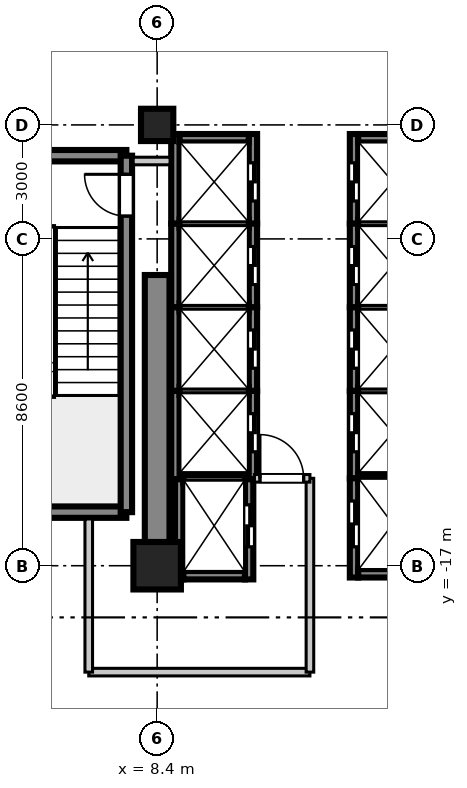
"""IFC4 building model, lengths in metres.
Left out: names, types, materials, properties, quantities, classifications, styles, units other than length and angle.
Written with IfcOpenShell. Run it as: python <this file> out.ifc"""

import sys

from ifc_helpers import new_model, si_unit, direction, frame, frame_2d, origin, origin_2d, place, context, subcontext, project, spatial, rectangle, extrude, source, transform, mapped, element, fill, save


model = new_model("IFC4")
c1 = context("Model", 3, precision=1e-05, world=origin(), true_north=direction((0.0, 1.0)))
c2 = subcontext(c1, "Body", "Model", "MODEL_VIEW")
j1 = project(units=[si_unit("LENGTHUNIT", "METRE"), si_unit("PLANEANGLEUNIT", "RADIAN")], contexts=[c1])
p1 = place(None, origin())
s1 = spatial("IfcSite", under=j1, at=p1, CompositionType="ELEMENT")
p2 = place(p1, origin())
s2 = spatial("IfcBuilding", under=s1, at=p2, CompositionType="ELEMENT")
p3 = place(p2, frame((0.0, 0.0, 139.4)))
s3 = spatial("IfcBuildingStorey", under=s2, at=p3, CompositionType="ELEMENT", Elevation=139.4)
m1 = source(origin(), c2, "Body", "SweptSolid", [
    extrude(rectangle(XDim=1.25, YDim=1.25, at=origin_2d()), origin(), (0.0, 0.0, 1.0), 4.755),
])
p4 = place(p3, frame((8.4, -17.0, 0.0), z_axis=(0.0, 0.0, 1.0), x_axis=(1.0, 0.0, 0.0)))
e1 = element("IfcColumn", 1, at=p4, inside=s3, PredefinedType="COLUMN", context=c2, shape_type="MappedRepresentation", body=[
    mapped(m1, transform((0.0, 0.0, 0.0), scale=1.0)),
])
m2 = source(origin(), c2, "Body", "SweptSolid", [
    extrude(rectangle(XDim=0.85, YDim=0.85, at=origin_2d()), origin(), (0.0, 0.0, 1.0), 4.755),
])
p5 = place(p3, frame((8.4, -5.4, 0.0), z_axis=(0.0, 0.0, 1.0), x_axis=(1.0, 0.0, 0.0)))
e2 = element("IfcColumn", 2, at=p5, inside=s3, PredefinedType="PILASTER", context=c2, shape_type="MappedRepresentation", body=[
    mapped(m2, transform((0.0, 0.0, 0.0), scale=1.0)),
])
m3 = source(origin(), c2, "Body", "SweptSolid", [
    extrude(rectangle(XDim=7.65, YDim=0.65, at=frame_2d((3.825, 0.0))), origin(), (0.0, 0.0, 1.0), 4.44),
])
p6 = place(p3, frame((8.4, -17.0, 0.0), z_axis=(0.0, 0.0, 1.0), x_axis=(0.0, 1.0, 0.0)))
e3 = element("IfcWall", 3, at=p6, inside=s3, PredefinedType="SHEAR", context=c2, shape_type="MappedRepresentation", body=[
    mapped(m3, transform((0.0, 0.0, 0.0), scale=1.0)),
])
m4 = source(origin(), c2, "Body", "SweptSolid", [
    extrude(rectangle(XDim=3.98, YDim=0.3, at=frame_2d((1.99, 0.0))), origin(), (0.0, 0.0, 1.0), 4.44),
])
for number, where, z_axis, x_axis in (
    (4, (3.61, -15.59, 0.0), (0.0, 0.0, 1.0), (1.0, 0.0, 0.0)),
    (5, (3.61, -6.21, 0.0), (0.0, 0.0, 1.0), (1.0, 0.0, 0.0)),
):
    element("IfcWall", number, at=place(p3, frame(where, z_axis=z_axis, x_axis=x_axis)), inside=s3, PredefinedType="SHEAR", context=c2, shape_type="MappedRepresentation", body=[
        mapped(m4, transform((0.0, 0.0, 0.0), scale=1.0)),
    ])
m5 = source(origin(), c2, "Body", "SweptSolid", [
    extrude(rectangle(XDim=9.38, YDim=0.3, at=frame_2d((4.69, 0.0))), origin(), (0.0, 0.0, 1.0), 4.44),
])
p7 = place(p3, frame((7.59, -15.59, 0.0), z_axis=(0.0, 0.0, 1.0), x_axis=(0.0, 1.0, 0.0)))
e6 = element("IfcWall", 6, at=p7, inside=s3, PredefinedType="SHEAR", context=c2, shape_type="MappedRepresentation", body=[
    mapped(m5, transform((0.0, 0.0, 0.0), scale=1.0)),
])
p8 = place(p7, frame((7.79, 0.0, 0.0)))
e7 = element("IfcOpeningElement", 7, at=p8, cuts=e6, PredefinedType="OPENING", context=c2, shape_type="SweptSolid", body=[
    extrude(rectangle(XDim=1.1, YDim=2.15, at=frame_2d((0.55, 1.075))), frame((0.0, 0.16, 0.0), z_axis=(0.0, -1.0, 0.0), x_axis=(1.0, 0.0, 0.0)), (0.0, 0.0, 1.0), 0.32),
])
m6 = source(origin(), c2, "Body", "SweptSolid", [
    extrude(rectangle(XDim=2.36, YDim=0.22, at=frame_2d((1.18, 0.0))), origin(), (0.0, 0.0, 1.0), 4.44),
])
p9 = place(p3, frame((13.58, -8.0, 0.0), z_axis=(0.0, 0.0, 1.0), x_axis=(0.0, 1.0, 0.0)))
e8 = element("IfcWall", 8, at=p9, inside=s3, PredefinedType="SHEAR", context=c2, shape_type="MappedRepresentation", body=[
    mapped(m6, transform((0.0, 0.0, 0.0), scale=1.0)),
])
p10 = place(p9, frame((0.6, 0.0, 0.0)))
e9 = element("IfcOpeningElement", 9, at=p10, cuts=e8, PredefinedType="OPENING", context=c2, shape_type="SweptSolid", body=[
    extrude(rectangle(XDim=1.0, YDim=2.2, at=frame_2d((0.5, 1.1))), frame((0.0, 0.12, 0.0), z_axis=(0.0, -1.0, 0.0), x_axis=(1.0, 0.0, 0.0)), (0.0, 0.0, 1.0), 0.24),
])
m7 = source(origin(), c2, "Body", "SweptSolid", [
    extrude(rectangle(XDim=1.82, YDim=0.22, at=frame_2d((0.91, 0.0))), origin(), (0.0, 0.0, 1.0), 4.44),
])
p11 = place(p3, frame((13.69, -5.75, 0.0), z_axis=(0.0, 0.0, 1.0), x_axis=(1.0, 0.0, 0.0)))
e10 = element("IfcWall", 10, at=p11, inside=s3, PredefinedType="SHEAR", context=c2, shape_type="MappedRepresentation", body=[
    mapped(m7, transform((0.0, 0.0, 0.0), scale=1.0)),
])
m8 = source(origin(), c2, "Body", "SweptSolid", [
    extrude(rectangle(XDim=2.2, YDim=0.22, at=frame_2d((1.1, 0.0))), origin(), (0.0, 0.0, 1.0), 4.44),
])
p12 = place(p3, frame((13.58, -10.2, 0.0), z_axis=(0.0, 0.0, 1.0), x_axis=(0.0, 1.0, 0.0)))
e11 = element("IfcWall", 11, at=p12, inside=s3, PredefinedType="SHEAR", context=c2, shape_type="MappedRepresentation", body=[
    mapped(m8, transform((0.0, 0.0, 0.0), scale=1.0)),
])
p13 = place(p12, frame((0.6, 0.0, 0.0)))
e12 = element("IfcOpeningElement", 12, at=p13, cuts=e11, PredefinedType="OPENING", context=c2, shape_type="SweptSolid", body=[
    extrude(rectangle(XDim=1.0, YDim=2.2, at=frame_2d((0.5, 1.1))), frame((0.0, 0.12, 0.0), z_axis=(0.0, -1.0, 0.0), x_axis=(1.0, 0.0, 0.0)), (0.0, 0.0, 1.0), 0.24),
])
m9 = source(origin(), c2, "Body", "SweptSolid", [
    extrude(rectangle(XDim=1.82, YDim=0.22, at=frame_2d((0.91, 0.0))), origin(), (0.0, 0.0, 1.0), 4.8),
])
p14 = place(p3, frame((13.69, -8.0, 0.0), z_axis=(0.0, 0.0, 1.0), x_axis=(1.0, 0.0, 0.0)))
e13 = element("IfcWall", 13, at=p14, inside=s3, PredefinedType="SHEAR", context=c2, shape_type="MappedRepresentation", body=[
    mapped(m9, transform((0.0, 0.0, 0.0), scale=1.0)),
])
p15 = place(p3, frame((13.58, -12.4, 0.0), z_axis=(0.0, 0.0, 1.0), x_axis=(0.0, 1.0, 0.0)))
e14 = element("IfcWall", 14, at=p15, inside=s3, PredefinedType="SHEAR", context=c2, shape_type="MappedRepresentation", body=[
    mapped(m8, transform((0.0, 0.0, 0.0), scale=1.0)),
])
p16 = place(p15, frame((0.6, 0.0, 0.0)))
e15 = element("IfcOpeningElement", 15, at=p16, cuts=e14, PredefinedType="OPENING", context=c2, shape_type="SweptSolid", body=[
    extrude(rectangle(XDim=1.0, YDim=2.2, at=frame_2d((0.5, 1.1))), frame((0.0, 0.12, 0.0), z_axis=(0.0, -1.0, 0.0), x_axis=(1.0, 0.0, 0.0)), (0.0, 0.0, 1.0), 0.24),
])
p17 = place(p3, frame((13.69, -10.2, 0.0), z_axis=(0.0, 0.0, 1.0), x_axis=(1.0, 0.0, 0.0)))
e16 = element("IfcWall", 16, at=p17, inside=s3, PredefinedType="SHEAR", context=c2, shape_type="MappedRepresentation", body=[
    mapped(m9, transform((0.0, 0.0, 0.0), scale=1.0)),
])
m10 = source(origin(), c2, "Body", "SweptSolid", [
    extrude(rectangle(XDim=2.3, YDim=0.22, at=frame_2d((1.15, 0.0))), origin(), (0.0, 0.0, 1.0), 4.44),
])
p18 = place(p3, frame((13.58, -14.7, 0.0), z_axis=(0.0, 0.0, 1.0), x_axis=(0.0, 1.0, 0.0)))
e17 = element("IfcWall", 17, at=p18, inside=s3, PredefinedType="SHEAR", context=c2, shape_type="MappedRepresentation", body=[
    mapped(m10, transform((0.0, 0.0, 0.0), scale=1.0)),
])
p19 = place(p18, frame((0.7, 0.0, 0.0)))
e18 = element("IfcOpeningElement", 18, at=p19, cuts=e17, PredefinedType="OPENING", context=c2, shape_type="SweptSolid", body=[
    extrude(rectangle(XDim=1.0, YDim=2.2, at=frame_2d((0.5, 1.1))), frame((0.0, 0.12, 0.0), z_axis=(0.0, -1.0, 0.0), x_axis=(1.0, 0.0, 0.0)), (0.0, 0.0, 1.0), 0.24),
])
p20 = place(p3, frame((13.69, -12.4, 0.0), z_axis=(0.0, 0.0, 1.0), x_axis=(1.0, 0.0, 0.0)))
e19 = element("IfcWall", 19, at=p20, inside=s3, PredefinedType="SHEAR", context=c2, shape_type="MappedRepresentation", body=[
    mapped(m9, transform((0.0, 0.0, 0.0), scale=1.0)),
])
p21 = place(p3, frame((8.88, -8.0, 0.0), z_axis=(0.0, 0.0, 1.0), x_axis=(0.0, 1.0, 0.0)))
e20 = element("IfcWall", 20, at=p21, inside=s3, PredefinedType="SHEAR", context=c2, shape_type="MappedRepresentation", body=[
    mapped(m6, transform((0.0, 0.0, 0.0), scale=1.0)),
])
p22 = place(p3, frame((10.92, -8.0, 0.0), z_axis=(0.0, 0.0, 1.0), x_axis=(0.0, 1.0, 0.0)))
e21 = element("IfcWall", 21, at=p22, inside=s3, PredefinedType="SHEAR", context=c2, shape_type="MappedRepresentation", body=[
    mapped(m6, transform((0.0, 0.0, 0.0), scale=1.0)),
])
p23 = place(p22, frame((0.6, 0.0, 0.0)))
e22 = element("IfcOpeningElement", 22, at=p23, cuts=e21, PredefinedType="OPENING", context=c2, shape_type="SweptSolid", body=[
    extrude(rectangle(XDim=1.0, YDim=2.2, at=frame_2d((0.5, 1.1))), frame((0.0, 0.12, 0.0), z_axis=(0.0, -1.0, 0.0), x_axis=(1.0, 0.0, 0.0)), (0.0, 0.0, 1.0), 0.24),
])
p24 = place(p3, frame((8.99, -5.75, 0.0), z_axis=(0.0, 0.0, 1.0), x_axis=(1.0, 0.0, 0.0)))
e23 = element("IfcWall", 23, at=p24, inside=s3, PredefinedType="SHEAR", context=c2, shape_type="MappedRepresentation", body=[
    mapped(m7, transform((0.0, 0.0, 0.0), scale=1.0)),
])
p25 = place(p3, frame((8.88, -10.2, 0.0), z_axis=(0.0, 0.0, 1.0), x_axis=(0.0, 1.0, 0.0)))
e24 = element("IfcWall", 24, at=p25, inside=s3, PredefinedType="SHEAR", context=c2, shape_type="MappedRepresentation", body=[
    mapped(m8, transform((0.0, 0.0, 0.0), scale=1.0)),
])
p26 = place(p3, frame((10.92, -10.2, 0.0), z_axis=(0.0, 0.0, 1.0), x_axis=(0.0, 1.0, 0.0)))
e25 = element("IfcWall", 25, at=p26, inside=s3, PredefinedType="SHEAR", context=c2, shape_type="MappedRepresentation", body=[
    mapped(m8, transform((0.0, 0.0, 0.0), scale=1.0)),
])
p27 = place(p26, frame((0.6, 0.0, 0.0)))
e26 = element("IfcOpeningElement", 26, at=p27, cuts=e25, PredefinedType="OPENING", context=c2, shape_type="SweptSolid", body=[
    extrude(rectangle(XDim=1.0, YDim=2.2, at=frame_2d((0.5, 1.1))), frame((0.0, 0.12, 0.0), z_axis=(0.0, -1.0, 0.0), x_axis=(1.0, 0.0, 0.0)), (0.0, 0.0, 1.0), 0.24),
])
p28 = place(p3, frame((8.99, -8.0, 0.0), z_axis=(0.0, 0.0, 1.0), x_axis=(1.0, 0.0, 0.0)))
e27 = element("IfcWall", 27, at=p28, inside=s3, PredefinedType="SHEAR", context=c2, shape_type="MappedRepresentation", body=[
    mapped(m9, transform((0.0, 0.0, 0.0), scale=1.0)),
])
p29 = place(p3, frame((8.88, -12.4, 0.0), z_axis=(0.0, 0.0, 1.0), x_axis=(0.0, 1.0, 0.0)))
e28 = element("IfcWall", 28, at=p29, inside=s3, PredefinedType="SHEAR", context=c2, shape_type="MappedRepresentation", body=[
    mapped(m8, transform((0.0, 0.0, 0.0), scale=1.0)),
])
p30 = place(p3, frame((10.92, -12.4, 0.0), z_axis=(0.0, 0.0, 1.0), x_axis=(0.0, 1.0, 0.0)))
e29 = element("IfcWall", 29, at=p30, inside=s3, PredefinedType="SHEAR", context=c2, shape_type="MappedRepresentation", body=[
    mapped(m8, transform((0.0, 0.0, 0.0), scale=1.0)),
])
p31 = place(p30, frame((0.6, 0.0, 0.0)))
e30 = element("IfcOpeningElement", 30, at=p31, cuts=e29, PredefinedType="OPENING", context=c2, shape_type="SweptSolid", body=[
    extrude(rectangle(XDim=1.0, YDim=2.2, at=frame_2d((0.5, 1.1))), frame((0.0, 0.12, 0.0), z_axis=(0.0, -1.0, 0.0), x_axis=(1.0, 0.0, 0.0)), (0.0, 0.0, 1.0), 0.24),
])
p32 = place(p3, frame((8.99, -10.2, 0.0), z_axis=(0.0, 0.0, 1.0), x_axis=(1.0, 0.0, 0.0)))
e31 = element("IfcWall", 31, at=p32, inside=s3, PredefinedType="SHEAR", context=c2, shape_type="MappedRepresentation", body=[
    mapped(m9, transform((0.0, 0.0, 0.0), scale=1.0)),
])
m11 = source(origin(), c2, "Body", "SweptSolid", [
    extrude(rectangle(XDim=2.325, YDim=0.22, at=frame_2d((1.163, 0.0))), origin(), (0.0, 0.0, 1.0), 4.44),
])
p33 = place(p3, frame((8.88, -14.725, 0.0), z_axis=(0.0, 0.0, 1.0), x_axis=(0.0, 1.0, 0.0)))
e32 = element("IfcWall", 32, at=p33, inside=s3, PredefinedType="SHEAR", context=c2, shape_type="MappedRepresentation", body=[
    mapped(m11, transform((0.0, 0.0, 0.0), scale=1.0)),
])
p34 = place(p3, frame((10.92, -14.725, 0.0), z_axis=(0.0, 0.0, 1.0), x_axis=(0.0, 1.0, 0.0)))
e33 = element("IfcWall", 33, at=p34, inside=s3, PredefinedType="SHEAR", context=c2, shape_type="MappedRepresentation", body=[
    mapped(m11, transform((0.0, 0.0, 0.0), scale=1.0)),
])
p35 = place(p34, frame((0.725, 0.0, 0.0)))
e34 = element("IfcOpeningElement", 34, at=p35, cuts=e33, PredefinedType="OPENING", context=c2, shape_type="SweptSolid", body=[
    extrude(rectangle(XDim=1.0, YDim=2.2, at=frame_2d((0.5, 1.1))), frame((0.0, 0.12, 0.0), z_axis=(0.0, -1.0, 0.0), x_axis=(1.0, 0.0, 0.0)), (0.0, 0.0, 1.0), 0.24),
])
p36 = place(p3, frame((8.99, -12.4, 0.0), z_axis=(0.0, 0.0, 1.0), x_axis=(1.0, 0.0, 0.0)))
e35 = element("IfcWall", 35, at=p36, inside=s3, PredefinedType="SHEAR", context=c2, shape_type="MappedRepresentation", body=[
    mapped(m9, transform((0.0, 0.0, 0.0), scale=1.0)),
])
m12 = source(origin(), c2, "Body", "SweptSolid", [
    extrude(rectangle(XDim=2.635, YDim=0.22, at=frame_2d((1.317, 0.0))), origin(), (0.0, 0.0, 1.0), 4.44),
])
p37 = place(p3, frame((8.98, -17.36, 0.0), z_axis=(0.0, 0.0, 1.0), x_axis=(0.0, 1.0, 0.0)))
e36 = element("IfcWall", 36, at=p37, inside=s3, PredefinedType="SHEAR", context=c2, shape_type="MappedRepresentation", body=[
    mapped(m12, transform((0.0, 0.0, 0.0), scale=1.0)),
])
p38 = place(p3, frame((10.82, -17.36, 0.0), z_axis=(0.0, 0.0, 1.0), x_axis=(0.0, 1.0, 0.0)))
e37 = element("IfcWall", 37, at=p38, inside=s3, PredefinedType="SHEAR", context=c2, shape_type="MappedRepresentation", body=[
    mapped(m12, transform((0.0, 0.0, 0.0), scale=1.0)),
])
p39 = place(p38, frame((0.86, 0.0, 0.0)))
e38 = element("IfcOpeningElement", 38, at=p39, cuts=e37, PredefinedType="OPENING", context=c2, shape_type="SweptSolid", body=[
    extrude(rectangle(XDim=1.1, YDim=2.2, at=frame_2d((0.55, 1.1))), frame((0.0, 0.12, 0.0), z_axis=(0.0, -1.0, 0.0), x_axis=(1.0, 0.0, 0.0)), (0.0, 0.0, 1.0), 0.24),
])
m13 = source(origin(), c2, "Body", "SweptSolid", [
    extrude(rectangle(XDim=1.62, YDim=0.22, at=frame_2d((0.81, 0.0))), origin(), (0.0, 0.0, 1.0), 4.44),
])
p40 = place(p3, frame((9.09, -17.25, 0.0), z_axis=(0.0, 0.0, 1.0), x_axis=(1.0, 0.0, 0.0)))
e39 = element("IfcWall", 39, at=p40, inside=s3, PredefinedType="SHEAR", context=c2, shape_type="MappedRepresentation", body=[
    mapped(m13, transform((0.0, 0.0, 0.0), scale=1.0)),
])
m14 = source(origin(), c2, "Body", "SweptSolid", [
    extrude(rectangle(XDim=1.62, YDim=0.22, at=frame_2d((0.81, 0.0))), origin(), (0.0, 0.0, 1.0), 4.8),
])
p41 = place(p3, frame((9.09, -14.725, 0.0), z_axis=(0.0, 0.0, 1.0), x_axis=(1.0, 0.0, 0.0)))
e40 = element("IfcWall", 40, at=p41, inside=s3, PredefinedType="SHEAR", context=c2, shape_type="MappedRepresentation", body=[
    mapped(m14, transform((0.0, 0.0, 0.0), scale=1.0)),
])
m15 = source(origin(), c2, "Body", "SweptSolid", [
    extrude(rectangle(XDim=2.61, YDim=0.22, at=frame_2d((1.305, 0.0))), origin(), (0.0, 0.0, 1.0), 4.44),
])
p42 = place(p3, frame((13.58, -17.31, 0.0), z_axis=(0.0, 0.0, 1.0), x_axis=(0.0, 1.0, 0.0)))
e41 = element("IfcWall", 41, at=p42, inside=s3, PredefinedType="SHEAR", context=c2, shape_type="MappedRepresentation", body=[
    mapped(m15, transform((0.0, 0.0, 0.0), scale=1.0)),
])
p43 = place(p42, frame((0.81, 0.0, 0.0)))
e42 = element("IfcOpeningElement", 42, at=p43, cuts=e41, PredefinedType="OPENING", context=c2, shape_type="SweptSolid", body=[
    extrude(rectangle(XDim=1.2, YDim=2.2, at=frame_2d((0.6, 1.1))), frame((0.0, 0.12, 0.0), z_axis=(0.0, -1.0, 0.0), x_axis=(1.0, 0.0, 0.0)), (0.0, 0.0, 1.0), 0.24),
])
p44 = place(p3, frame((13.69, -17.2, 0.0), z_axis=(0.0, 0.0, 1.0), x_axis=(1.0, 0.0, 0.0)))
e43 = element("IfcWall", 43, at=p44, inside=s3, PredefinedType="SHEAR", context=c2, shape_type="MappedRepresentation", body=[
    mapped(m7, transform((0.0, 0.0, 0.0), scale=1.0)),
])
p45 = place(p3, frame((13.69, -14.7, 0.0), z_axis=(0.0, 0.0, 1.0), x_axis=(1.0, 0.0, 0.0)))
e44 = element("IfcWall", 44, at=p45, inside=s3, PredefinedType="SHEAR", context=c2, shape_type="MappedRepresentation", body=[
    mapped(m9, transform((0.0, 0.0, 0.0), scale=1.0)),
])
m16 = source(origin(), c2, "Body", "SweptSolid", [
    extrude(rectangle(XDim=5.82, YDim=0.2, at=frame_2d((2.91, 0.0))), origin(), (0.0, 0.0, 1.0), 3.4),
])
p46 = place(p3, frame((6.6, -19.8, 0.0), z_axis=(0.0, 0.0, 1.0), x_axis=(1.0, 0.0, 0.0)))
e45 = element("IfcWall", 45, at=p46, inside=s3, PredefinedType="PARTITIONING", context=c2, shape_type="MappedRepresentation", body=[
    mapped(m16, transform((0.0, 0.0, 0.0), scale=1.0)),
])
m17 = source(origin(), c2, "Body", "SweptSolid", [
    extrude(rectangle(XDim=4.03, YDim=0.2, at=frame_2d((2.015, 0.0))), origin(), (0.0, 0.0, 1.0), 3.4),
])
p47 = place(p3, frame((6.6, -19.8, 0.0), z_axis=(0.0, 0.0, 1.0), x_axis=(0.0, 1.0, 0.0)))
e46 = element("IfcWall", 46, at=p47, inside=s3, PredefinedType="PARTITIONING", context=c2, shape_type="MappedRepresentation", body=[
    mapped(m17, transform((0.0, 0.0, 0.0), scale=1.0)),
])
m18 = source(origin(), c2, "Body", "SweptSolid", [
    extrude(rectangle(XDim=5.1, YDim=0.2, at=frame_2d((2.55, 0.0))), origin(), (0.0, 0.0, 1.0), 3.4),
])
p48 = place(p3, frame((12.42, -19.8, 0.0), z_axis=(0.0, 0.0, 1.0), x_axis=(0.0, 1.0, 0.0)))
e47 = element("IfcWall", 47, at=p48, inside=s3, PredefinedType="PARTITIONING", context=c2, shape_type="MappedRepresentation", body=[
    mapped(m18, transform((0.0, 0.0, 0.0), scale=1.0)),
])
m19 = source(origin(), c2, "Body", "SweptSolid", [
    extrude(rectangle(XDim=1.46, YDim=0.2, at=frame_2d((0.73, 0.0))), origin(), (0.0, 0.0, 1.0), 3.4),
])
p49 = place(p3, frame((10.96, -14.7, 0.0), z_axis=(0.0, 0.0, 1.0), x_axis=(1.0, 0.0, 0.0)))
e48 = element("IfcWall", 48, at=p49, inside=s3, PredefinedType="PARTITIONING", context=c2, shape_type="MappedRepresentation", body=[
    mapped(m19, transform((0.0, 0.0, 0.0), scale=1.0)),
])
p50 = place(p49, frame((0.145, 0.0, 0.0)))
e49 = element("IfcOpeningElement", 49, at=p50, cuts=e48, PredefinedType="OPENING", context=c2, shape_type="SweptSolid", body=[
    extrude(rectangle(XDim=1.15, YDim=2.15, at=frame_2d((0.575, 1.075))), frame((0.0, 0.11, 0.0), z_axis=(0.0, -1.0, 0.0), x_axis=(1.0, 0.0, 0.0)), (0.0, 0.0, 1.0), 0.22),
])
m20 = source(origin(), c2, "Body", "SweptSolid", [
    extrude(rectangle(XDim=0.97, YDim=0.2, at=frame_2d((0.485, 0.0))), origin(), (0.0, 0.0, 1.0), 3.4),
])
p51 = place(p3, frame((7.77, -6.35, 0.0), z_axis=(0.0, 0.0, 1.0), x_axis=(1.0, 0.0, 0.0)))
e50 = element("IfcWall", 50, at=p51, inside=s3, PredefinedType="PARTITIONING", context=c2, shape_type="MappedRepresentation", body=[
    mapped(m20, transform((0.0, 0.0, 0.0), scale=1.0)),
])
m21 = source(origin(), c2, "Body", "SweptSolid", [
    extrude(rectangle(XDim=1.1, YDim=2.15, at=frame_2d((0.55, 1.075))), frame((0.0, 0.025, 0.0), z_axis=(0.0, -1.0, 0.0), x_axis=(1.0, 0.0, 0.0)), (0.0, 0.0, 1.0), 0.05),
])
p52 = place(p8, origin())
e51 = element("IfcDoor", 51, at=p52, inside=s3, OperationType="SINGLE_SWING_RIGHT", PredefinedType="DOOR", context=c2, shape_type="MappedRepresentation", body=[
    mapped(m21, transform((0.0, 0.0, 0.0), scale=1.0)),
])
fill(e7, e51)
m22 = source(origin(), c2, "Body", "SweptSolid", [
    extrude(rectangle(XDim=1.0, YDim=2.2, at=frame_2d((0.5, 1.1))), frame((0.0, 0.025, 0.0), z_axis=(0.0, -1.0, 0.0), x_axis=(1.0, 0.0, 0.0)), (0.0, 0.0, 1.0), 0.05),
])
p53 = place(p10, origin())
e52 = element("IfcDoor", 52, at=p53, inside=s3, OperationType="DOUBLE_DOOR_SLIDING", PredefinedType="DOOR", context=c2, shape_type="MappedRepresentation", body=[
    mapped(m22, transform((0.0, 0.0, 0.0), scale=1.0)),
])
fill(e9, e52)
p54 = place(p13, origin())
e53 = element("IfcDoor", 53, at=p54, inside=s3, OperationType="DOUBLE_DOOR_SLIDING", PredefinedType="DOOR", context=c2, shape_type="MappedRepresentation", body=[
    mapped(m22, transform((0.0, 0.0, 0.0), scale=1.0)),
])
fill(e12, e53)
p55 = place(p16, origin())
e54 = element("IfcDoor", 54, at=p55, inside=s3, OperationType="DOUBLE_DOOR_SLIDING", PredefinedType="DOOR", context=c2, shape_type="MappedRepresentation", body=[
    mapped(m22, transform((0.0, 0.0, 0.0), scale=1.0)),
])
fill(e15, e54)
p56 = place(p19, origin())
e55 = element("IfcDoor", 55, at=p56, inside=s3, OperationType="DOUBLE_DOOR_SLIDING", PredefinedType="DOOR", context=c2, shape_type="MappedRepresentation", body=[
    mapped(m22, transform((0.0, 0.0, 0.0), scale=1.0)),
])
fill(e18, e55)
p57 = place(p23, frame((1.0, 0.0, 0.0), z_axis=(0.0, 0.0, 1.0), x_axis=(-1.0, 0.0, 0.0)))
e56 = element("IfcDoor", 56, at=p57, inside=s3, OperationType="DOUBLE_DOOR_SLIDING", PredefinedType="DOOR", context=c2, shape_type="MappedRepresentation", body=[
    mapped(m22, transform((0.0, 0.0, 0.0), scale=1.0)),
])
fill(e22, e56)
p58 = place(p27, frame((1.0, 0.0, 0.0), z_axis=(0.0, 0.0, 1.0), x_axis=(-1.0, 0.0, 0.0)))
e57 = element("IfcDoor", 57, at=p58, inside=s3, OperationType="DOUBLE_DOOR_SLIDING", PredefinedType="DOOR", context=c2, shape_type="MappedRepresentation", body=[
    mapped(m22, transform((0.0, 0.0, 0.0), scale=1.0)),
])
fill(e26, e57)
p59 = place(p31, frame((1.0, 0.0, 0.0), z_axis=(0.0, 0.0, 1.0), x_axis=(-1.0, 0.0, 0.0)))
e58 = element("IfcDoor", 58, at=p59, inside=s3, OperationType="DOUBLE_DOOR_SLIDING", PredefinedType="DOOR", context=c2, shape_type="MappedRepresentation", body=[
    mapped(m22, transform((0.0, 0.0, 0.0), scale=1.0)),
])
fill(e30, e58)
p60 = place(p35, frame((1.0, 0.0, 0.0), z_axis=(0.0, 0.0, 1.0), x_axis=(-1.0, 0.0, 0.0)))
e59 = element("IfcDoor", 59, at=p60, inside=s3, OperationType="DOUBLE_DOOR_SLIDING", PredefinedType="DOOR", context=c2, shape_type="MappedRepresentation", body=[
    mapped(m22, transform((0.0, 0.0, 0.0), scale=1.0)),
])
fill(e34, e59)
m23 = source(origin(), c2, "Body", "SweptSolid", [
    extrude(rectangle(XDim=1.1, YDim=2.2, at=frame_2d((0.55, 1.1))), frame((0.0, 0.025, 0.0), z_axis=(0.0, -1.0, 0.0), x_axis=(1.0, 0.0, 0.0)), (0.0, 0.0, 1.0), 0.05),
])
p61 = place(p39, frame((1.1, 0.0, 0.0), z_axis=(0.0, 0.0, 1.0), x_axis=(-1.0, 0.0, 0.0)))
e60 = element("IfcDoor", 60, at=p61, inside=s3, OperationType="DOUBLE_DOOR_SLIDING", PredefinedType="DOOR", context=c2, shape_type="MappedRepresentation", body=[
    mapped(m23, transform((0.0, 0.0, 0.0), scale=1.0)),
])
fill(e38, e60)
m24 = source(origin(), c2, "Body", "SweptSolid", [
    extrude(rectangle(XDim=1.2, YDim=2.2, at=frame_2d((0.6, 1.1))), frame((0.0, 0.025, 0.0), z_axis=(0.0, -1.0, 0.0), x_axis=(1.0, 0.0, 0.0)), (0.0, 0.0, 1.0), 0.05),
])
p62 = place(p43, origin())
e61 = element("IfcDoor", 61, at=p62, inside=s3, OperationType="DOUBLE_DOOR_SLIDING", PredefinedType="DOOR", context=c2, shape_type="MappedRepresentation", body=[
    mapped(m24, transform((0.0, 0.0, 0.0), scale=1.0)),
])
fill(e42, e61)
m25 = source(origin(), c2, "Body", "SweptSolid", [
    extrude(rectangle(XDim=1.15, YDim=2.15, at=frame_2d((0.575, 1.075))), frame((0.0, 0.025, 0.0), z_axis=(0.0, -1.0, 0.0), x_axis=(1.0, 0.0, 0.0)), (0.0, 0.0, 1.0), 0.05),
])
p63 = place(p50, origin())
e62 = element("IfcDoor", 62, at=p63, inside=s3, OperationType="SINGLE_SWING_LEFT", PredefinedType="DOOR", context=c2, shape_type="MappedRepresentation", body=[
    mapped(m25, transform((0.0, 0.0, 0.0), scale=1.0)),
])
fill(e49, e62)
save(model, sys.argv[1])
